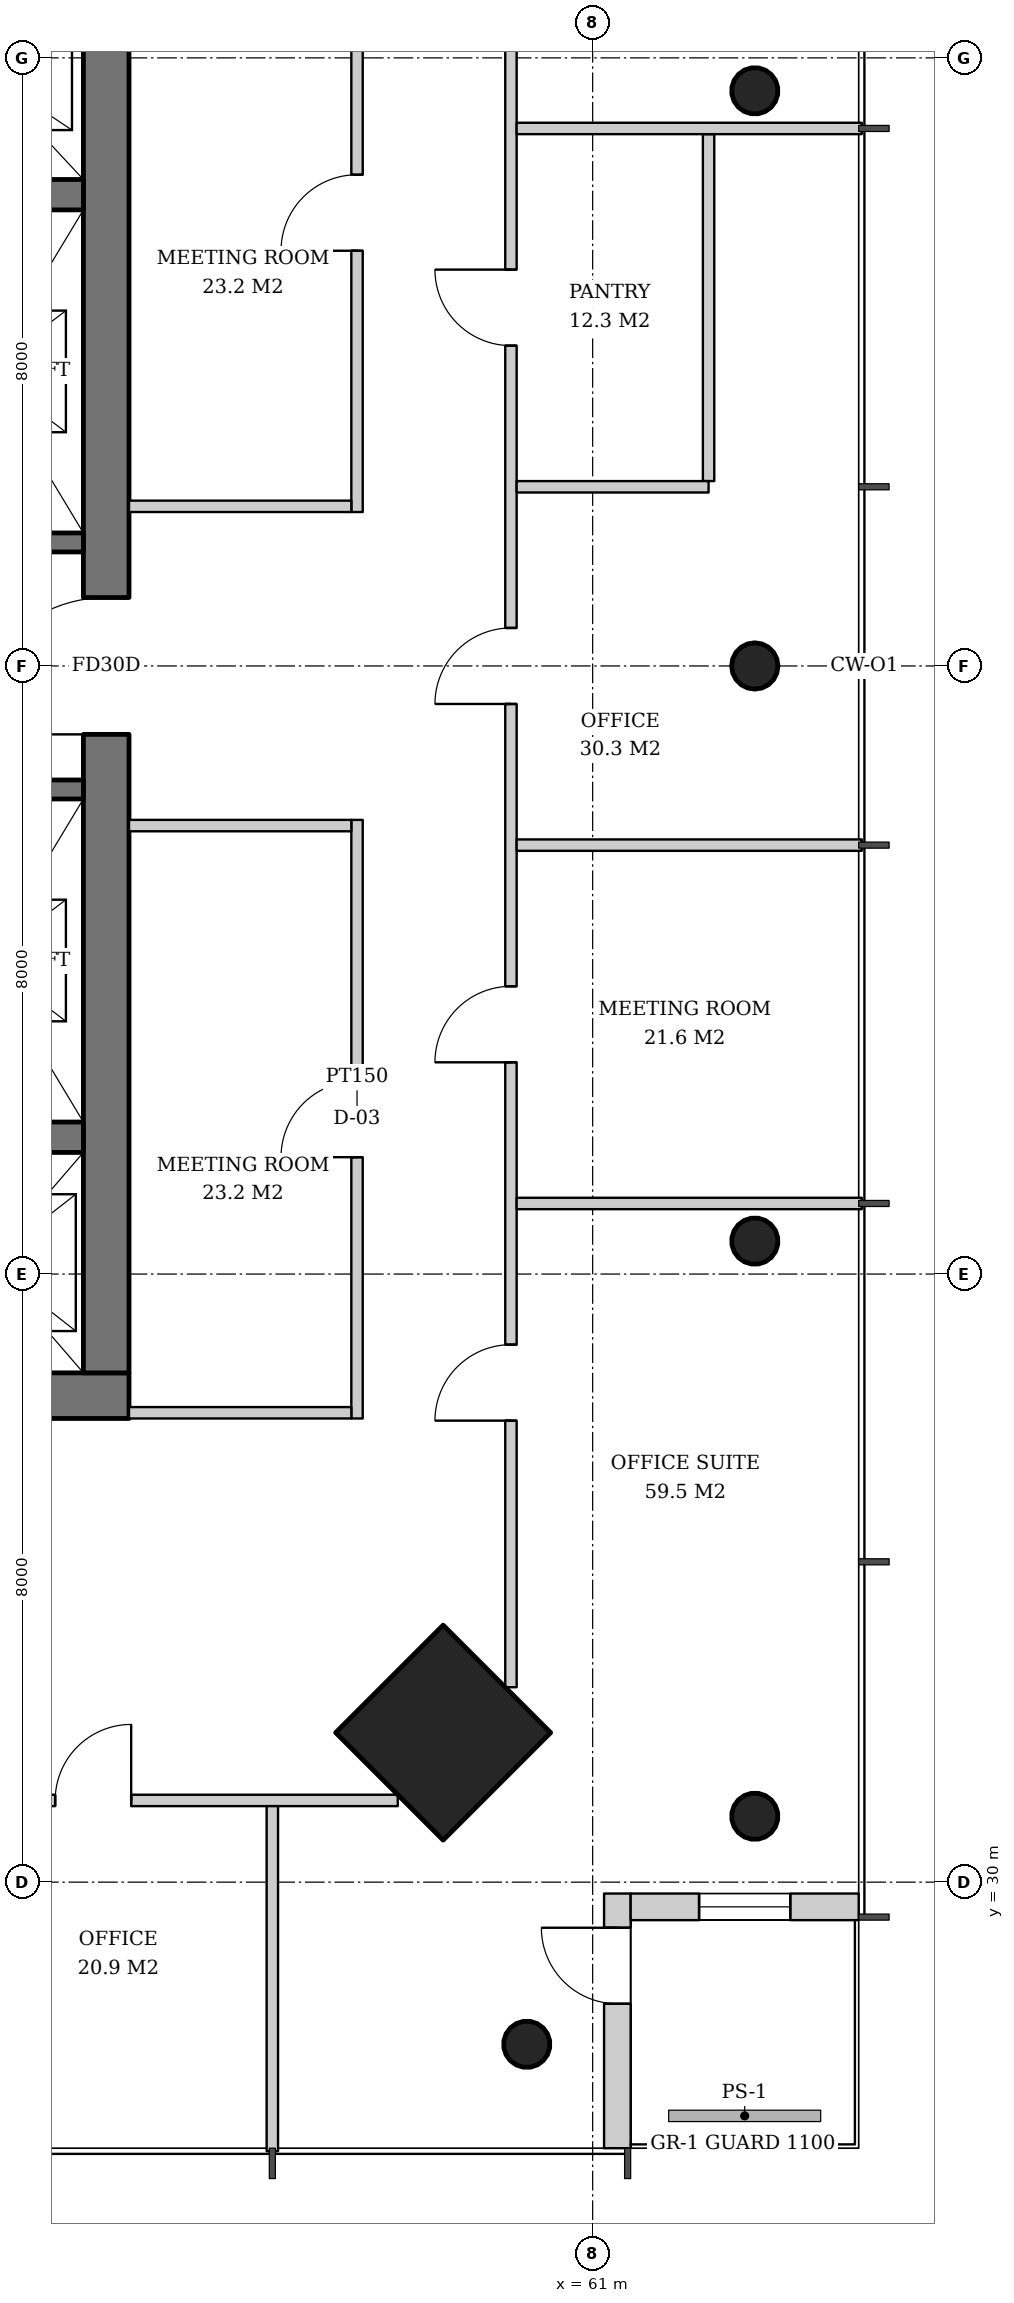
"""IFC4 building model, lengths in metres.
Left out: names, types, materials, properties, quantities, classifications, styles, units other than length and angle.
Written with IfcOpenShell. Run it as: python <this file> out.ifc"""

import sys

from ifc_helpers import new_model, si_unit, direction, frame, frame_2d, origin, origin_2d, place, context, subcontext, project, spatial, rectangle, hollow_circle, extrude, element, fill, save


model = new_model("IFC4")
c1 = context("Model", 3, precision=1e-05, world=origin(), true_north=direction((0.0, 1.0)))
c2 = subcontext(c1, "Body", "Model", "MODEL_VIEW")
j1 = project(units=[si_unit("LENGTHUNIT", "METRE"), si_unit("PLANEANGLEUNIT", "RADIAN")], contexts=[c1])
p1 = place(None, origin())
s1 = spatial("IfcSite", under=j1, at=p1, CompositionType="ELEMENT")
p2 = place(p1, origin())
s2 = spatial("IfcBuilding", under=s1, at=p2, CompositionType="ELEMENT")
p3 = place(p2, frame((0.0, 0.0, 203.4)))
s3 = spatial("IfcBuildingStorey", under=s2, at=p3, CompositionType="ELEMENT", Elevation=203.4)
p4 = place(p3, frame((63.171, 30.829, 0.0), z_axis=(-0.031898107953, 0.031898107953, 0.998981992539), x_axis=(-0.707106781187, -0.707106781187, 0.0)))
e1 = element("IfcColumn", 1, at=p4, inside=s3, PredefinedType="COLUMN", context=c2, shape_type="SweptSolid", body=[
    extrude(hollow_circle(Radius=0.305, WallThickness=0.025, at=origin_2d()), origin(), (0.0, 0.0, 1.0), 3.804),
])
p5 = place(p3, frame((63.171, 38.414, 0.0), z_axis=(-0.031910269556, 0.015987237665, 0.999362868496), x_axis=(-0.447933021895, -0.894067115991, 0.0)))
e2 = element("IfcColumn", 2, at=p5, inside=s3, PredefinedType="COLUMN", context=c2, shape_type="SweptSolid", body=[
    extrude(hollow_circle(Radius=0.305, WallThickness=0.025, at=origin_2d()), origin(), (0.0, 0.0, 1.0), 3.802),
])
p6 = place(p3, frame((63.171, 46.0, 0.0), z_axis=(-0.031914348339, 0.0, 0.999490607445), x_axis=(0.0, -1.0, 0.0)))
e3 = element("IfcColumn", 3, at=p6, inside=s3, PredefinedType="COLUMN", context=c2, shape_type="SweptSolid", body=[
    extrude(hollow_circle(Radius=0.305, WallThickness=0.025, at=origin_2d()), origin(), (0.0, 0.0, 1.0), 3.802),
])
p7 = place(p3, frame((63.171, 53.586, 0.0), z_axis=(-0.031910269556, -0.015987237665, 0.999362868496), x_axis=(0.447933021895, -0.894067115991, 0.0)))
e4 = element("IfcColumn", 4, at=p7, inside=s3, PredefinedType="COLUMN", context=c2, shape_type="SweptSolid", body=[
    extrude(hollow_circle(Radius=0.305, WallThickness=0.025, at=origin_2d()), origin(), (0.0, 0.0, 1.0), 3.802),
])
p8 = place(p3, frame((59.072, 31.928, 0.0), z_axis=(-0.031962158256, 0.031962158256, 0.998977898093), x_axis=(-0.707106781187, -0.707106781187, 0.0)))
e5 = element("IfcColumn", 5, at=p8, inside=s3, PredefinedType="COLUMN", context=c2, shape_type="SweptSolid", body=[
    extrude(rectangle(XDim=2.0, YDim=2.0, at=origin_2d()), origin(), (0.0, 0.0, 1.0), 3.804),
])
p9 = place(p3, frame((60.171, 27.829, 0.0), z_axis=(-0.031898107953, 0.031898107953, 0.998981992539), x_axis=(-0.707106781187, -0.707106781187, 0.0)))
e6 = element("IfcColumn", 6, at=p9, inside=s3, PredefinedType="COLUMN", context=c2, shape_type="SweptSolid", body=[
    extrude(hollow_circle(Radius=0.305, WallThickness=0.025, at=origin_2d()), origin(), (0.0, 0.0, 1.0), 3.804),
])
p10 = place(p3, frame((35.1, 36.4, 0.0), z_axis=(0.0, 0.0, 1.0), x_axis=(1.0, 0.0, 0.0)))
e7 = element("IfcWall", 7, at=p10, inside=s3, PredefinedType="SHEAR", context=c2, shape_type="SweptSolid", body=[
    extrude(rectangle(XDim=19.8, YDim=0.6, at=frame_2d((9.9, 0.0))), origin(), (0.0, 0.0, 1.0), 3.8),
])
p11 = place(p10, frame((3.9, 0.0, 0.0)))
e8 = element("IfcOpeningElement", 8, at=p11, cuts=e7, PredefinedType="OPENING", context=c2, shape_type="SweptSolid", body=[
    extrude(rectangle(XDim=1.0, YDim=2.1, at=frame_2d((0.5, 1.05))), frame((0.0, 0.31, 0.0), z_axis=(0.0, -1.0, 0.0), x_axis=(1.0, 0.0, 0.0)), (0.0, 0.0, 1.0), 0.62),
])
p12 = place(p10, frame((15.35, 0.0, 0.0)))
e9 = element("IfcOpeningElement", 9, at=p12, cuts=e7, PredefinedType="OPENING", context=c2, shape_type="SweptSolid", body=[
    extrude(rectangle(XDim=1.0, YDim=2.1, at=frame_2d((0.5, 1.05))), frame((0.0, 0.31, 0.0), z_axis=(0.0, -1.0, 0.0), x_axis=(1.0, 0.0, 0.0)), (0.0, 0.0, 1.0), 0.62),
])
p13 = place(p3, frame((54.6, 36.7, 0.0), z_axis=(0.0, 0.0, 1.0), x_axis=(0.0, 1.0, 0.0)))
e10 = element("IfcWall", 10, at=p13, inside=s3, PredefinedType="SHEAR", context=c2, shape_type="SweptSolid", body=[
    extrude(rectangle(XDim=18.6, YDim=0.6, at=frame_2d((9.3, 0.0))), origin(), (0.0, 0.0, 1.0), 3.8),
])
p14 = place(p13, frame((8.4, 0.0, 0.0)))
e11 = element("IfcOpeningElement", 11, at=p14, cuts=e10, PredefinedType="OPENING", context=c2, shape_type="SweptSolid", body=[
    extrude(rectangle(XDim=1.8, YDim=2.4, at=frame_2d((0.9, 1.2))), frame((0.0, 0.31, 0.0), z_axis=(0.0, -1.0, 0.0), x_axis=(1.0, 0.0, 0.0)), (0.0, 0.0, 1.0), 0.62),
])
for number, where, z_axis, x_axis in (
    (12, (35.7, 39.8, 0.0), (0.0, 0.0, 1.0), (1.0, 0.0, 0.0)),
    (13, (35.7, 52.2, 0.0), (0.0, 0.0, 1.0), (1.0, 0.0, 0.0)),
):
    element("IfcWall", number, at=place(p3, frame(where, z_axis=z_axis, x_axis=x_axis)), inside=s3, PredefinedType="SHEAR", context=c2, shape_type="SweptSolid", body=[
        extrude(rectangle(XDim=18.6, YDim=0.4, at=frame_2d((9.3, 0.0))), origin(), (0.0, 0.0, 1.0), 3.8),
    ])
p15 = place(p3, frame((61.325, 26.5, 0.0), z_axis=(0.0, 0.0, 1.0), x_axis=(0.0, 1.0, 0.0)))
e14 = element("IfcWall", 14, at=p15, inside=s3, PredefinedType="SOLIDWALL", context=c2, shape_type="SweptSolid", body=[
    extrude(rectangle(XDim=3.35, YDim=0.35, at=frame_2d((1.675, 0.0))), origin(), (0.0, 0.0, 1.0), 3.62),
])
p16 = place(p15, frame((1.9, 0.0, 0.0)))
e15 = element("IfcOpeningElement", 15, at=p16, cuts=e14, PredefinedType="OPENING", context=c2, shape_type="SweptSolid", body=[
    extrude(rectangle(XDim=1.0, YDim=2.4, at=frame_2d((0.5, 1.2))), frame((0.0, 0.185, 0.0), z_axis=(0.0, -1.0, 0.0), x_axis=(1.0, 0.0, 0.0)), (0.0, 0.0, 1.0), 0.37),
])
p17 = place(p3, frame((61.5, 29.675, 0.0), z_axis=(0.0, 0.0, 1.0), x_axis=(1.0, 0.0, 0.0)))
e16 = element("IfcWall", 16, at=p17, inside=s3, PredefinedType="SOLIDWALL", context=c2, shape_type="SweptSolid", body=[
    extrude(rectangle(XDim=3.0, YDim=0.35, at=frame_2d((1.5, 0.0))), origin(), (0.0, 0.0, 1.0), 3.62),
])
p18 = place(p17, frame((0.9, 0.0, 0.6)))
e17 = element("IfcOpeningElement", 17, at=p18, cuts=e16, PredefinedType="OPENING", context=c2, shape_type="SweptSolid", body=[
    extrude(rectangle(XDim=1.2, YDim=2.55, at=frame_2d((0.6, 1.275))), frame((0.0, 0.185, 0.0), z_axis=(0.0, -1.0, 0.0), x_axis=(1.0, 0.0, 0.0)), (0.0, 0.0, 1.0), 0.37),
])
for number, where, z_axis, x_axis in (
    (18, (48.93, 47.625, 0.0), (0.0, 0.0, 1.0), (1.0, 0.0, 0.0)),
    (19, (48.93, 44.375, 0.0), (0.0, 0.0, 1.0), (1.0, 0.0, 0.0)),
):
    element("IfcWall", number, at=place(p3, frame(where, z_axis=z_axis, x_axis=x_axis)), inside=s3, PredefinedType="SHEAR", context=c2, shape_type="SweptSolid", body=[
        extrude(rectangle(XDim=5.37, YDim=0.25, at=frame_2d((2.685, 0.0))), origin(), (0.0, 0.0, 1.0), 3.8),
    ])
p19 = place(p3, frame((57.9, 36.1, 0.0), z_axis=(0.0, 0.0, 1.0), x_axis=(0.0, 1.0, 0.0)))
e20 = element("IfcWall", 20, at=p19, inside=s3, PredefinedType="PARTITIONING", context=c2, shape_type="SweptSolid", body=[
    extrude(rectangle(XDim=7.875, YDim=0.15, at=frame_2d((3.938, 0.0))), origin(), (0.0, 0.0, 1.0), 2.867),
])
p20 = place(p19, frame((3.438, 0.0, 0.0)))
e21 = element("IfcOpeningElement", 21, at=p20, cuts=e20, PredefinedType="OPENING", context=c2, shape_type="SweptSolid", body=[
    extrude(rectangle(XDim=1.0, YDim=2.1, at=frame_2d((0.5, 1.05))), frame((0.0, 0.085, 0.0), z_axis=(0.0, -1.0, 0.0), x_axis=(1.0, 0.0, 0.0)), (0.0, 0.0, 1.0), 0.17),
])
p21 = place(p3, frame((54.9, 36.175, 0.0), z_axis=(0.0, 0.0, 1.0), x_axis=(1.0, 0.0, 0.0)))
e22 = element("IfcWall", 22, at=p21, inside=s3, PredefinedType="PARTITIONING", context=c2, shape_type="SweptSolid", body=[
    extrude(rectangle(XDim=2.925, YDim=0.15, at=frame_2d((1.462, 0.0))), origin(), (0.0, 0.0, 1.0), 2.867),
])
p22 = place(p3, frame((54.9, 43.9, 0.0), z_axis=(0.0, 0.0, 1.0), x_axis=(1.0, 0.0, 0.0)))
e23 = element("IfcWall", 23, at=p22, inside=s3, PredefinedType="PARTITIONING", context=c2, shape_type="SweptSolid", body=[
    extrude(rectangle(XDim=2.925, YDim=0.15, at=frame_2d((1.462, 0.0))), origin(), (0.0, 0.0, 1.0), 3.62),
])
p23 = place(p3, frame((57.9, 48.025, 0.0), z_axis=(0.0, 0.0, 1.0), x_axis=(0.0, 1.0, 0.0)))
e24 = element("IfcWall", 24, at=p23, inside=s3, PredefinedType="PARTITIONING", context=c2, shape_type="SweptSolid", body=[
    extrude(rectangle(XDim=7.875, YDim=0.15, at=frame_2d((3.938, 0.0))), origin(), (0.0, 0.0, 1.0), 2.867),
])
p24 = place(p23, frame((3.438, 0.0, 0.0)))
e25 = element("IfcOpeningElement", 25, at=p24, cuts=e24, PredefinedType="OPENING", context=c2, shape_type="SweptSolid", body=[
    extrude(rectangle(XDim=1.0, YDim=2.1, at=frame_2d((0.5, 1.05))), frame((0.0, 0.085, 0.0), z_axis=(0.0, -1.0, 0.0), x_axis=(1.0, 0.0, 0.0)), (0.0, 0.0, 1.0), 0.17),
])
p25 = place(p3, frame((54.9, 48.1, 0.0), z_axis=(0.0, 0.0, 1.0), x_axis=(1.0, 0.0, 0.0)))
e26 = element("IfcWall", 26, at=p25, inside=s3, PredefinedType="PARTITIONING", context=c2, shape_type="SweptSolid", body=[
    extrude(rectangle(XDim=2.925, YDim=0.15, at=frame_2d((1.462, 0.0))), origin(), (0.0, 0.0, 1.0), 2.867),
])
p26 = place(p3, frame((62.525, 48.432, 0.0), z_axis=(0.0, 0.0, 1.0), x_axis=(0.0, 1.0, 0.0)))
e27 = element("IfcWall", 27, at=p26, inside=s3, PredefinedType="PARTITIONING", context=c2, shape_type="SweptSolid", body=[
    extrude(rectangle(XDim=4.564, YDim=0.15, at=frame_2d((2.282, 0.0))), origin(), (0.0, 0.0, 1.0), 2.867),
])
p27 = place(p3, frame((59.925, 32.564, 0.0), z_axis=(0.0, 0.0, 1.0), x_axis=(0.0, 1.0, 0.0)))
e28 = element("IfcWall", 28, at=p27, inside=s3, PredefinedType="PARTITIONING", context=c2, shape_type="SweptSolid", body=[
    extrude(rectangle(XDim=26.872, YDim=0.15, at=frame_2d((13.436, 0.0))), origin(), (0.0, 0.0, 1.0), 2.867),
])
p28 = place(p27, frame((3.507, 0.0, 0.0)))
e29 = element("IfcOpeningElement", 29, at=p28, cuts=e28, PredefinedType="OPENING", context=c2, shape_type="SweptSolid", body=[
    extrude(rectangle(XDim=1.0, YDim=2.1, at=frame_2d((0.5, 1.05))), frame((0.0, 0.085, 0.0), z_axis=(0.0, -1.0, 0.0), x_axis=(1.0, 0.0, 0.0)), (0.0, 0.0, 1.0), 0.17),
])
p29 = place(p27, frame((8.221, 0.0, 0.0)))
e30 = element("IfcOpeningElement", 30, at=p29, cuts=e28, PredefinedType="OPENING", context=c2, shape_type="SweptSolid", body=[
    extrude(rectangle(XDim=1.0, YDim=2.1, at=frame_2d((0.5, 1.05))), frame((0.0, 0.085, 0.0), z_axis=(0.0, -1.0, 0.0), x_axis=(1.0, 0.0, 0.0)), (0.0, 0.0, 1.0), 0.17),
])
p30 = place(p27, frame((12.936, 0.0, 0.0)))
e31 = element("IfcOpeningElement", 31, at=p30, cuts=e28, PredefinedType="OPENING", context=c2, shape_type="SweptSolid", body=[
    extrude(rectangle(XDim=1.0, YDim=2.1, at=frame_2d((0.5, 1.05))), frame((0.0, 0.085, 0.0), z_axis=(0.0, -1.0, 0.0), x_axis=(1.0, 0.0, 0.0)), (0.0, 0.0, 1.0), 0.17),
])
p31 = place(p27, frame((17.65, 0.0, 0.0)))
e32 = element("IfcOpeningElement", 32, at=p31, cuts=e28, PredefinedType="OPENING", context=c2, shape_type="SweptSolid", body=[
    extrude(rectangle(XDim=1.0, YDim=2.1, at=frame_2d((0.5, 1.05))), frame((0.0, 0.085, 0.0), z_axis=(0.0, -1.0, 0.0), x_axis=(1.0, 0.0, 0.0)), (0.0, 0.0, 1.0), 0.17),
])
p32 = place(p27, frame((22.364, 0.0, 0.0)))
e33 = element("IfcOpeningElement", 33, at=p32, cuts=e28, PredefinedType="OPENING", context=c2, shape_type="SweptSolid", body=[
    extrude(rectangle(XDim=1.0, YDim=2.1, at=frame_2d((0.5, 1.05))), frame((0.0, 0.085, 0.0), z_axis=(0.0, -1.0, 0.0), x_axis=(1.0, 0.0, 0.0)), (0.0, 0.0, 1.0), 0.17),
])
for number, where, z_axis, x_axis in (
    (34, (60.0, 38.928, 0.0), (0.0, 0.0, 1.0), (1.0, 0.0, 0.0)),
    (35, (60.0, 43.643, 0.0), (0.0, 0.0, 1.0), (1.0, 0.0, 0.0)),
):
    element("IfcWall", number, at=place(p3, frame(where, z_axis=z_axis, x_axis=x_axis)), inside=s3, PredefinedType="PARTITIONING", context=c2, shape_type="SweptSolid", body=[
        extrude(rectangle(XDim=4.54, YDim=0.15, at=frame_2d((2.27, 0.0))), origin(), (0.0, 0.0, 1.0), 3.12),
    ])
p33 = place(p3, frame((60.0, 48.357, 0.0), z_axis=(0.0, 0.0, 1.0), x_axis=(1.0, 0.0, 0.0)))
e36 = element("IfcWall", 36, at=p33, inside=s3, PredefinedType="PARTITIONING", context=c2, shape_type="SweptSolid", body=[
    extrude(rectangle(XDim=2.525, YDim=0.15, at=frame_2d((1.262, 0.0))), origin(), (0.0, 0.0, 1.0), 2.867),
])
p34 = place(p3, frame((60.0, 53.072, 0.0), z_axis=(0.0, 0.0, 1.0), x_axis=(1.0, 0.0, 0.0)))
e37 = element("IfcWall", 37, at=p34, inside=s3, PredefinedType="PARTITIONING", context=c2, shape_type="SweptSolid", body=[
    extrude(rectangle(XDim=4.54, YDim=0.15, at=frame_2d((2.27, 0.0))), origin(), (0.0, 0.0, 1.0), 3.12),
])
p35 = place(p3, frame((31.564, 31.075, 0.0), z_axis=(0.0, 0.0, 1.0), x_axis=(1.0, 0.0, 0.0)))
e38 = element("IfcWall", 38, at=p35, inside=s3, PredefinedType="PARTITIONING", context=c2, shape_type="SweptSolid", body=[
    extrude(rectangle(XDim=26.872, YDim=0.15, at=frame_2d((13.436, 0.0))), origin(), (0.0, 0.0, 1.0), 2.867),
])
p36 = place(p35, frame((3.507, 0.0, 0.0)))
e39 = element("IfcOpeningElement", 39, at=p36, cuts=e38, PredefinedType="OPENING", context=c2, shape_type="SweptSolid", body=[
    extrude(rectangle(XDim=1.0, YDim=2.1, at=frame_2d((0.5, 1.05))), frame((0.0, 0.085, 0.0), z_axis=(0.0, -1.0, 0.0), x_axis=(1.0, 0.0, 0.0)), (0.0, 0.0, 1.0), 0.17),
])
p37 = place(p35, frame((8.221, 0.0, 0.0)))
e40 = element("IfcOpeningElement", 40, at=p37, cuts=e38, PredefinedType="OPENING", context=c2, shape_type="SweptSolid", body=[
    extrude(rectangle(XDim=1.0, YDim=2.1, at=frame_2d((0.5, 1.05))), frame((0.0, 0.085, 0.0), z_axis=(0.0, -1.0, 0.0), x_axis=(1.0, 0.0, 0.0)), (0.0, 0.0, 1.0), 0.17),
])
p38 = place(p35, frame((12.936, 0.0, 0.0)))
e41 = element("IfcOpeningElement", 41, at=p38, cuts=e38, PredefinedType="OPENING", context=c2, shape_type="SweptSolid", body=[
    extrude(rectangle(XDim=1.0, YDim=2.1, at=frame_2d((0.5, 1.05))), frame((0.0, 0.085, 0.0), z_axis=(0.0, -1.0, 0.0), x_axis=(1.0, 0.0, 0.0)), (0.0, 0.0, 1.0), 0.17),
])
p39 = place(p35, frame((17.65, 0.0, 0.0)))
e42 = element("IfcOpeningElement", 42, at=p39, cuts=e38, PredefinedType="OPENING", context=c2, shape_type="SweptSolid", body=[
    extrude(rectangle(XDim=1.0, YDim=2.1, at=frame_2d((0.5, 1.05))), frame((0.0, 0.085, 0.0), z_axis=(0.0, -1.0, 0.0), x_axis=(1.0, 0.0, 0.0)), (0.0, 0.0, 1.0), 0.17),
])
p40 = place(p35, frame((22.364, 0.0, 0.0)))
e43 = element("IfcOpeningElement", 43, at=p40, cuts=e38, PredefinedType="OPENING", context=c2, shape_type="SweptSolid", body=[
    extrude(rectangle(XDim=1.0, YDim=2.1, at=frame_2d((0.5, 1.05))), frame((0.0, 0.085, 0.0), z_axis=(0.0, -1.0, 0.0), x_axis=(1.0, 0.0, 0.0)), (0.0, 0.0, 1.0), 0.17),
])
p41 = place(p3, frame((56.786, 31.0, 0.0), z_axis=(0.0, 0.0, 1.0), x_axis=(0.0, -1.0, 0.0)))
e44 = element("IfcWall", 44, at=p41, inside=s3, PredefinedType="PARTITIONING", context=c2, shape_type="SweptSolid", body=[
    extrude(rectangle(XDim=4.54, YDim=0.15, at=frame_2d((2.27, 0.0))), origin(), (0.0, 0.0, 1.0), 3.12),
])
p42 = place(p16, origin())
e45 = element("IfcDoor", 45, at=p42, inside=s3, OperationType="SINGLE_SWING_RIGHT", PredefinedType="DOOR", context=c2, shape_type="SweptSolid", body=[
    extrude(rectangle(XDim=1.0, YDim=2.4, at=frame_2d((0.5, 1.2))), frame((0.0, 0.025, 0.0), z_axis=(0.0, -1.0, 0.0), x_axis=(1.0, 0.0, 0.0)), (0.0, 0.0, 1.0), 0.05),
])
fill(e15, e45)
p43 = place(p18, origin())
e46 = element("IfcWindow", 46, at=p43, inside=s3, PartitioningType="SINGLE_PANEL", PredefinedType="WINDOW", context=c2, shape_type="SweptSolid", body=[
    extrude(rectangle(XDim=1.2, YDim=2.55, at=frame_2d((0.6, 1.275))), frame((0.0, 0.03, 0.0), z_axis=(0.0, -1.0, 0.0), x_axis=(1.0, 0.0, 0.0)), (0.0, 0.0, 1.0), 0.06),
])
fill(e17, e46)
p44 = place(p14, origin())
e47 = element("IfcDoor", 47, at=p44, inside=s3, OperationType="DOUBLE_DOOR_SINGLE_SWING", PredefinedType="DOOR", context=c2, shape_type="SweptSolid", body=[
    extrude(rectangle(XDim=1.8, YDim=2.4, at=frame_2d((0.9, 1.2))), frame((0.0, 0.025, 0.0), z_axis=(0.0, -1.0, 0.0), x_axis=(1.0, 0.0, 0.0)), (0.0, 0.0, 1.0), 0.05),
])
fill(e11, e47)
p45 = place(p20, origin())
e48 = element("IfcDoor", 48, at=p45, inside=s3, OperationType="SINGLE_SWING_LEFT", PredefinedType="DOOR", context=c2, shape_type="SweptSolid", body=[
    extrude(rectangle(XDim=1.0, YDim=2.1, at=frame_2d((0.5, 1.05))), frame((0.0, 0.025, 0.0), z_axis=(0.0, -1.0, 0.0), x_axis=(1.0, 0.0, 0.0)), (0.0, 0.0, 1.0), 0.05),
])
fill(e21, e48)
p46 = place(p24, origin())
e49 = element("IfcDoor", 49, at=p46, inside=s3, OperationType="SINGLE_SWING_LEFT", PredefinedType="DOOR", context=c2, shape_type="SweptSolid", body=[
    extrude(rectangle(XDim=1.0, YDim=2.1, at=frame_2d((0.5, 1.05))), frame((0.0, 0.025, 0.0), z_axis=(0.0, -1.0, 0.0), x_axis=(1.0, 0.0, 0.0)), (0.0, 0.0, 1.0), 0.05),
])
fill(e25, e49)
p47 = place(p28, origin())
e50 = element("IfcDoor", 50, at=p47, inside=s3, OperationType="SINGLE_SWING_LEFT", PredefinedType="DOOR", context=c2, shape_type="SweptSolid", body=[
    extrude(rectangle(XDim=1.0, YDim=2.1, at=frame_2d((0.5, 1.05))), frame((0.0, 0.025, 0.0), z_axis=(0.0, -1.0, 0.0), x_axis=(1.0, 0.0, 0.0)), (0.0, 0.0, 1.0), 0.05),
])
fill(e29, e50)
p48 = place(p29, origin())
e51 = element("IfcDoor", 51, at=p48, inside=s3, OperationType="SINGLE_SWING_LEFT", PredefinedType="DOOR", context=c2, shape_type="SweptSolid", body=[
    extrude(rectangle(XDim=1.0, YDim=2.1, at=frame_2d((0.5, 1.05))), frame((0.0, 0.025, 0.0), z_axis=(0.0, -1.0, 0.0), x_axis=(1.0, 0.0, 0.0)), (0.0, 0.0, 1.0), 0.05),
])
fill(e30, e51)
p49 = place(p30, origin())
e52 = element("IfcDoor", 52, at=p49, inside=s3, OperationType="SINGLE_SWING_LEFT", PredefinedType="DOOR", context=c2, shape_type="SweptSolid", body=[
    extrude(rectangle(XDim=1.0, YDim=2.1, at=frame_2d((0.5, 1.05))), frame((0.0, 0.025, 0.0), z_axis=(0.0, -1.0, 0.0), x_axis=(1.0, 0.0, 0.0)), (0.0, 0.0, 1.0), 0.05),
])
fill(e31, e52)
p50 = place(p31, origin())
e53 = element("IfcDoor", 53, at=p50, inside=s3, OperationType="SINGLE_SWING_RIGHT", PredefinedType="DOOR", context=c2, shape_type="SweptSolid", body=[
    extrude(rectangle(XDim=1.0, YDim=2.1, at=frame_2d((0.5, 1.05))), frame((0.0, 0.025, 0.0), z_axis=(0.0, -1.0, 0.0), x_axis=(1.0, 0.0, 0.0)), (0.0, 0.0, 1.0), 0.05),
])
fill(e32, e53)
p51 = place(p40, origin())
e54 = element("IfcDoor", 54, at=p51, inside=s3, OperationType="SINGLE_SWING_RIGHT", PredefinedType="DOOR", context=c2, shape_type="SweptSolid", body=[
    extrude(rectangle(XDim=1.0, YDim=2.1, at=frame_2d((0.5, 1.05))), frame((0.0, 0.025, 0.0), z_axis=(0.0, -1.0, 0.0), x_axis=(1.0, 0.0, 0.0)), (0.0, 0.0, 1.0), 0.05),
])
fill(e43, e54)
save(model, sys.argv[1])
